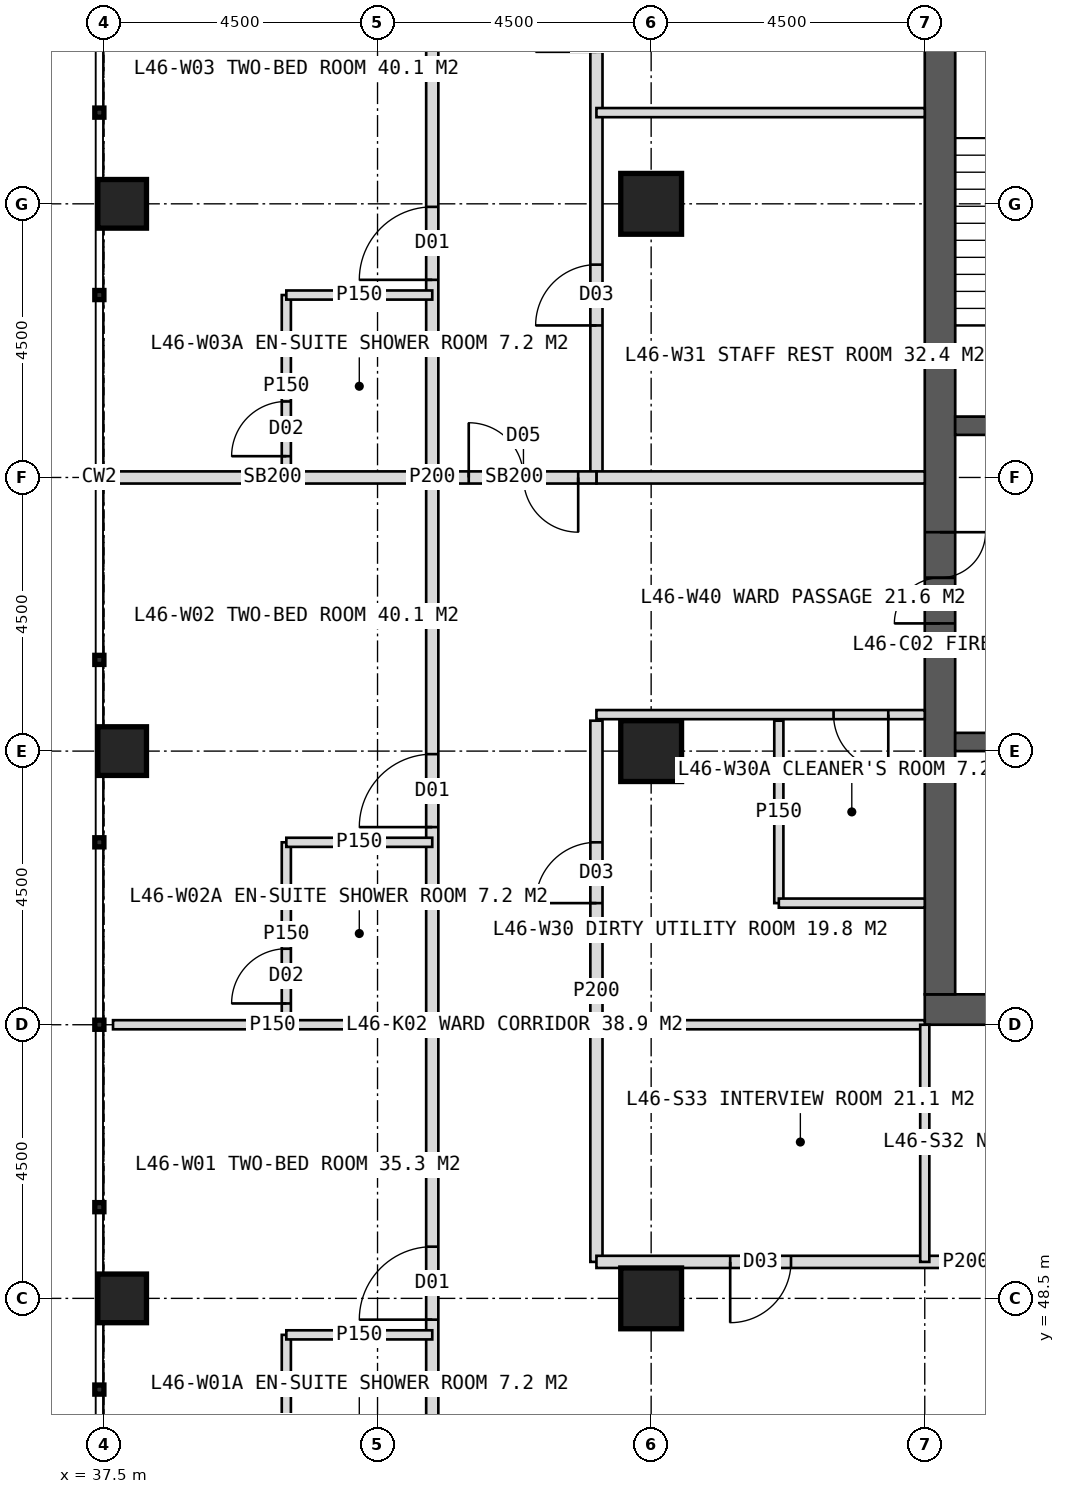
"""IFC4 building model, lengths in metres.
Left out: names, types, materials, properties, quantities, classifications, styles, units other than length and angle.
Written with IfcOpenShell. Run it as: python <this file> out.ifc"""

import sys

from ifc_helpers import new_model, si_unit, direction, frame, frame_2d, origin, origin_2d, place, context, subcontext, project, spatial, rectangle, hollow_rectangle, extrude, element, fill, save


model = new_model("IFC4")
c1 = context("Model", 3, precision=1e-05, world=origin(), true_north=direction((0.0, 1.0)))
c2 = subcontext(c1, "Body", "Model", "MODEL_VIEW")
j1 = project(units=[si_unit("LENGTHUNIT", "METRE"), si_unit("PLANEANGLEUNIT", "RADIAN")], contexts=[c1])
p1 = place(None, origin())
s1 = spatial("IfcSite", under=j1, at=p1, CompositionType="ELEMENT")
p2 = place(p1, origin())
s2 = spatial("IfcBuilding", under=s1, at=p2, CompositionType="ELEMENT")
p3 = place(p2, frame((0.0, 0.0, 193.0)))
s3 = spatial("IfcBuildingStorey", under=s2, at=p3, CompositionType="ELEMENT", Elevation=193.0)
p4 = place(p3, frame((51.0, 53.25, 0.0), z_axis=(0.0, 0.0, 1.0), x_axis=(1.0, 0.0, 0.0)))
e1 = element("IfcWall", 1, at=p4, inside=s3, PredefinedType="SHEAR", context=c2, shape_type="SweptSolid", body=[
    extrude(rectangle(XDim=18.0, YDim=0.5, at=frame_2d((9.0, 0.0))), origin(), (0.0, 0.0, 1.0), 4.0),
])
p5 = place(p4, frame((8.1, 0.0, 0.0)))
e2 = element("IfcOpeningElement", 2, at=p5, cuts=e1, PredefinedType="OPENING", context=c2, shape_type="SweptSolid", body=[
    extrude(rectangle(XDim=1.8, YDim=2.2, at=frame_2d((0.9, 1.1))), frame((0.0, 0.26, 0.0), z_axis=(0.0, -1.0, 0.0), x_axis=(1.0, 0.0, 0.0)), (0.0, 0.0, 1.0), 0.52),
])
p6 = place(p3, frame((51.25, 53.5, 0.0), z_axis=(0.0, 0.0, 1.0), x_axis=(0.0, 1.0, 0.0)))
e3 = element("IfcWall", 3, at=p6, inside=s3, PredefinedType="SHEAR", context=c2, shape_type="SweptSolid", body=[
    extrude(rectangle(XDim=17.0, YDim=0.5, at=frame_2d((8.5, 0.0))), origin(), (0.0, 0.0, 1.0), 4.0),
])
p7 = place(p6, frame((6.1, 0.0, 0.0)))
e4 = element("IfcOpeningElement", 4, at=p7, cuts=e3, PredefinedType="OPENING", context=c2, shape_type="SweptSolid", body=[
    extrude(rectangle(XDim=1.5, YDim=2.2, at=frame_2d((0.75, 1.1))), frame((0.0, 0.26, 0.0), z_axis=(0.0, -1.0, 0.0), x_axis=(1.0, 0.0, 0.0)), (0.0, 0.0, 1.0), 0.52),
])
p8 = place(p3, frame((51.5, 62.85, 0.0), z_axis=(0.0, 0.0, 1.0), x_axis=(1.0, 0.0, 0.0)))
e5 = element("IfcWall", 5, at=p8, inside=s3, PredefinedType="SHEAR", context=c2, shape_type="SweptSolid", body=[
    extrude(rectangle(XDim=3.3, YDim=0.3, at=frame_2d((1.65, 0.0))), origin(), (0.0, 0.0, 1.0), 4.0),
])
p9 = place(p8, frame((1.15, 0.0, 0.0)))
e6 = element("IfcOpeningElement", 6, at=p9, cuts=e5, PredefinedType="OPENING", context=c2, shape_type="SweptSolid", body=[
    extrude(rectangle(XDim=1.2, YDim=2.1, at=frame_2d((0.6, 1.05))), frame((0.0, 0.16, 0.0), z_axis=(0.0, -1.0, 0.0), x_axis=(1.0, 0.0, 0.0)), (0.0, 0.0, 1.0), 0.32),
])
p10 = place(p3, frame((51.5, 57.65, 0.0), z_axis=(0.0, 0.0, 1.0), x_axis=(1.0, 0.0, 0.0)))
e7 = element("IfcWall", 7, at=p10, inside=s3, PredefinedType="SHEAR", context=c2, shape_type="SweptSolid", body=[
    extrude(rectangle(XDim=3.3, YDim=0.3, at=frame_2d((1.65, 0.0))), origin(), (0.0, 0.0, 1.0), 4.0),
])
p11 = place(p10, frame((1.15, 0.0, 0.0)))
e8 = element("IfcOpeningElement", 8, at=p11, cuts=e7, PredefinedType="OPENING", context=c2, shape_type="SweptSolid", body=[
    extrude(rectangle(XDim=1.2, YDim=2.2, at=frame_2d((0.6, 1.1))), frame((0.0, 0.16, 0.0), z_axis=(0.0, -1.0, 0.0), x_axis=(1.0, 0.0, 0.0)), (0.0, 0.0, 1.0), 0.32),
])
for number, where, z_axis, x_axis in (
    (9, (46.5, 48.5, 0.0), (0.0, 0.0, 1.0), (1.0, 0.0, 0.0)),
    (10, (46.5, 57.5, 0.0), (0.0, 0.0, 1.0), (1.0, 0.0, 0.0)),
    (11, (46.5, 66.5, 0.0), (0.0, 0.0, 1.0), (1.0, 0.0, 0.0)),
):
    element("IfcColumn", number, at=place(p3, frame(where, z_axis=z_axis, x_axis=x_axis)), inside=s3, PredefinedType="COLUMN", context=c2, shape_type="SweptSolid", body=[
        extrude(hollow_rectangle(XDim=1.0, YDim=1.0, WallThickness=0.1, at=origin_2d()), origin(), (0.0, 0.0, 1.0), 4.0),
    ])
for number, where, z_axis, x_axis in (
    (12, (37.8, 48.5, 0.0), (0.0, 0.0, 1.0), (1.0, 0.0, 0.0)),
    (13, (37.8, 57.5, 0.0), (0.0, 0.0, 1.0), (1.0, 0.0, 0.0)),
    (14, (37.8, 66.5, 0.0), (0.0, 0.0, 1.0), (1.0, 0.0, 0.0)),
):
    element("IfcColumn", number, at=place(p3, frame(where, z_axis=z_axis, x_axis=x_axis)), inside=s3, PredefinedType="COLUMN", context=c2, shape_type="SweptSolid", body=[
        extrude(hollow_rectangle(XDim=0.8, YDim=0.8, WallThickness=0.08, at=origin_2d()), origin(), (0.0, 0.0, 1.0), 4.0),
    ])
p12 = place(p3, frame((42.9, 53.0, 0.0), z_axis=(0.0, 0.0, 1.0), x_axis=(-1.0, 0.0, 0.0)))
e15 = element("IfcWall", 15, at=p12, inside=s3, PredefinedType="PARTITIONING", context=c2, shape_type="SweptSolid", body=[
    extrude(rectangle(XDim=5.25, YDim=0.15, at=frame_2d((2.625, 0.0))), origin(), (0.0, 0.0, 1.0), 3.75),
])
p13 = place(p3, frame((42.9, 62.0, 0.0), z_axis=(0.0, 0.0, 1.0), x_axis=(-1.0, 0.0, 0.0)))
e16 = element("IfcWall", 16, at=p13, inside=s3, PredefinedType="SOLIDWALL", context=c2, shape_type="SweptSolid", body=[
    extrude(rectangle(XDim=5.25, YDim=0.2, at=frame_2d((2.625, 0.0))), origin(), (0.0, 0.0, 1.0), 2.95),
])
p14 = place(p3, frame((42.9, 44.9, 0.0), z_axis=(0.0, 0.0, 1.0), x_axis=(0.0, 1.0, 0.0)))
e17 = element("IfcWall", 17, at=p14, inside=s3, PredefinedType="PARTITIONING", context=c2, shape_type="SweptSolid", body=[
    extrude(rectangle(XDim=34.2, YDim=0.2, at=frame_2d((17.1, 0.0))), origin(), (0.0, 0.0, 1.0), 3.75),
])
p15 = place(p14, frame((3.25, 0.0, 0.0)))
e18 = element("IfcOpeningElement", 18, at=p15, cuts=e17, PredefinedType="OPENING", context=c2, shape_type="SweptSolid", body=[
    extrude(rectangle(XDim=1.2, YDim=2.2, at=frame_2d((0.6, 1.1))), frame((0.0, 0.11, 0.0), z_axis=(0.0, -1.0, 0.0), x_axis=(1.0, 0.0, 0.0)), (0.0, 0.0, 1.0), 0.22),
])
p16 = place(p14, frame((11.35, 0.0, 0.0)))
e19 = element("IfcOpeningElement", 19, at=p16, cuts=e17, PredefinedType="OPENING", context=c2, shape_type="SweptSolid", body=[
    extrude(rectangle(XDim=1.2, YDim=2.2, at=frame_2d((0.6, 1.1))), frame((0.0, 0.11, 0.0), z_axis=(0.0, -1.0, 0.0), x_axis=(1.0, 0.0, 0.0)), (0.0, 0.0, 1.0), 0.22),
])
p17 = place(p14, frame((20.35, 0.0, 0.0)))
e20 = element("IfcOpeningElement", 20, at=p17, cuts=e17, PredefinedType="OPENING", context=c2, shape_type="SweptSolid", body=[
    extrude(rectangle(XDim=1.2, YDim=2.2, at=frame_2d((0.6, 1.1))), frame((0.0, 0.11, 0.0), z_axis=(0.0, -1.0, 0.0), x_axis=(1.0, 0.0, 0.0)), (0.0, 0.0, 1.0), 0.22),
])
p18 = place(p14, frame((29.35, 0.0, 0.0)))
e21 = element("IfcOpeningElement", 21, at=p18, cuts=e17, PredefinedType="OPENING", context=c2, shape_type="SweptSolid", body=[
    extrude(rectangle(XDim=1.2, YDim=2.2, at=frame_2d((0.6, 1.1))), frame((0.0, 0.11, 0.0), z_axis=(0.0, -1.0, 0.0), x_axis=(1.0, 0.0, 0.0)), (0.0, 0.0, 1.0), 0.22),
])
p19 = place(p3, frame((40.5, 44.9, 0.0), z_axis=(0.0, 0.0, 1.0), x_axis=(0.0, 1.0, 0.0)))
e22 = element("IfcWall", 22, at=p19, inside=s3, PredefinedType="PARTITIONING", context=c2, shape_type="SweptSolid", body=[
    extrude(rectangle(XDim=3.0, YDim=0.15, at=frame_2d((1.5, 0.0))), origin(), (0.0, 0.0, 1.0), 3.75),
])
p20 = place(p19, frame((0.35, 0.0, 0.0)))
e23 = element("IfcOpeningElement", 23, at=p20, cuts=e22, PredefinedType="OPENING", context=c2, shape_type="SweptSolid", body=[
    extrude(rectangle(XDim=0.9, YDim=2.1, at=frame_2d((0.45, 1.05))), frame((0.0, 0.085, 0.0), z_axis=(0.0, -1.0, 0.0), x_axis=(1.0, 0.0, 0.0)), (0.0, 0.0, 1.0), 0.17),
])
p21 = place(p3, frame((42.9, 47.9, 0.0), z_axis=(0.0, 0.0, 1.0), x_axis=(-1.0, 0.0, 0.0)))
e24 = element("IfcWall", 24, at=p21, inside=s3, PredefinedType="PARTITIONING", context=c2, shape_type="SweptSolid", body=[
    extrude(rectangle(XDim=2.4, YDim=0.15, at=frame_2d((1.2, 0.0))), origin(), (0.0, 0.0, 1.0), 3.75),
])
p22 = place(p3, frame((40.5, 53.0, 0.0), z_axis=(0.0, 0.0, 1.0), x_axis=(0.0, 1.0, 0.0)))
e25 = element("IfcWall", 25, at=p22, inside=s3, PredefinedType="PARTITIONING", context=c2, shape_type="SweptSolid", body=[
    extrude(rectangle(XDim=3.0, YDim=0.15, at=frame_2d((1.5, 0.0))), origin(), (0.0, 0.0, 1.0), 3.75),
])
p23 = place(p22, frame((0.35, 0.0, 0.0)))
e26 = element("IfcOpeningElement", 26, at=p23, cuts=e25, PredefinedType="OPENING", context=c2, shape_type="SweptSolid", body=[
    extrude(rectangle(XDim=0.9, YDim=2.1, at=frame_2d((0.45, 1.05))), frame((0.0, 0.085, 0.0), z_axis=(0.0, -1.0, 0.0), x_axis=(1.0, 0.0, 0.0)), (0.0, 0.0, 1.0), 0.17),
])
p24 = place(p3, frame((42.9, 56.0, 0.0), z_axis=(0.0, 0.0, 1.0), x_axis=(-1.0, 0.0, 0.0)))
e27 = element("IfcWall", 27, at=p24, inside=s3, PredefinedType="PARTITIONING", context=c2, shape_type="SweptSolid", body=[
    extrude(rectangle(XDim=2.4, YDim=0.15, at=frame_2d((1.2, 0.0))), origin(), (0.0, 0.0, 1.0), 3.75),
])
p25 = place(p3, frame((40.5, 62.0, 0.0), z_axis=(0.0, 0.0, 1.0), x_axis=(0.0, 1.0, 0.0)))
e28 = element("IfcWall", 28, at=p25, inside=s3, PredefinedType="PARTITIONING", context=c2, shape_type="SweptSolid", body=[
    extrude(rectangle(XDim=3.0, YDim=0.15, at=frame_2d((1.5, 0.0))), origin(), (0.0, 0.0, 1.0), 3.75),
])
p26 = place(p25, frame((0.35, 0.0, 0.0)))
e29 = element("IfcOpeningElement", 29, at=p26, cuts=e28, PredefinedType="OPENING", context=c2, shape_type="SweptSolid", body=[
    extrude(rectangle(XDim=0.9, YDim=2.1, at=frame_2d((0.45, 1.05))), frame((0.0, 0.085, 0.0), z_axis=(0.0, -1.0, 0.0), x_axis=(1.0, 0.0, 0.0)), (0.0, 0.0, 1.0), 0.17),
])
p27 = place(p3, frame((42.9, 65.0, 0.0), z_axis=(0.0, 0.0, 1.0), x_axis=(-1.0, 0.0, 0.0)))
e30 = element("IfcWall", 30, at=p27, inside=s3, PredefinedType="PARTITIONING", context=c2, shape_type="SweptSolid", body=[
    extrude(rectangle(XDim=2.4, YDim=0.15, at=frame_2d((1.2, 0.0))), origin(), (0.0, 0.0, 1.0), 3.75),
])
p28 = place(p3, frame((51.0, 53.0, 0.0), z_axis=(0.0, 0.0, 1.0), x_axis=(-1.0, 0.0, 0.0)))
e31 = element("IfcWall", 31, at=p28, inside=s3, PredefinedType="PARTITIONING", context=c2, shape_type="SweptSolid", body=[
    extrude(rectangle(XDim=5.4, YDim=0.15, at=frame_2d((2.7, 0.0))), origin(), (0.0, 0.0, 1.0), 3.75),
])
p29 = place(p3, frame((45.6, 49.1, 0.0), z_axis=(0.0, 0.0, 1.0), x_axis=(0.0, 1.0, 0.0)))
e32 = element("IfcWall", 32, at=p29, inside=s3, PredefinedType="PARTITIONING", context=c2, shape_type="SweptSolid", body=[
    extrude(rectangle(XDim=8.9, YDim=0.2, at=frame_2d((4.45, 0.0))), origin(), (0.0, 0.0, 1.0), 3.75),
])
p30 = place(p29, frame((5.9, 0.0, 0.0)))
e33 = element("IfcOpeningElement", 33, at=p30, cuts=e32, PredefinedType="OPENING", context=c2, shape_type="SweptSolid", body=[
    extrude(rectangle(XDim=1.0, YDim=2.1, at=frame_2d((0.5, 1.05))), frame((0.0, 0.11, 0.0), z_axis=(0.0, -1.0, 0.0), x_axis=(1.0, 0.0, 0.0)), (0.0, 0.0, 1.0), 0.22),
])
p31 = place(p3, frame((45.6, 62.0, 0.0), z_axis=(0.0, 0.0, 1.0), x_axis=(0.0, 1.0, 0.0)))
e34 = element("IfcWall", 34, at=p31, inside=s3, PredefinedType="PARTITIONING", context=c2, shape_type="SweptSolid", body=[
    extrude(rectangle(XDim=14.4, YDim=0.2, at=frame_2d((7.2, 0.0))), origin(), (0.0, 0.0, 1.0), 3.75),
])
p32 = place(p31, frame((2.5, 0.0, 0.0)))
e35 = element("IfcOpeningElement", 35, at=p32, cuts=e34, PredefinedType="OPENING", context=c2, shape_type="SweptSolid", body=[
    extrude(rectangle(XDim=1.0, YDim=2.1, at=frame_2d((0.5, 1.05))), frame((0.0, 0.11, 0.0), z_axis=(0.0, -1.0, 0.0), x_axis=(1.0, 0.0, 0.0)), (0.0, 0.0, 1.0), 0.22),
])
p33 = place(p31, frame((7.0, 0.0, 0.0)))
e36 = element("IfcOpeningElement", 36, at=p33, cuts=e34, PredefinedType="OPENING", context=c2, shape_type="SweptSolid", body=[
    extrude(rectangle(XDim=1.0, YDim=2.1, at=frame_2d((0.5, 1.05))), frame((0.0, 0.11, 0.0), z_axis=(0.0, -1.0, 0.0), x_axis=(1.0, 0.0, 0.0)), (0.0, 0.0, 1.0), 0.22),
])
p34 = place(p31, frame((11.2, 0.0, 0.0)))
e37 = element("IfcOpeningElement", 37, at=p34, cuts=e34, PredefinedType="OPENING", context=c2, shape_type="SweptSolid", body=[
    extrude(rectangle(XDim=1.0, YDim=2.1, at=frame_2d((0.5, 1.05))), frame((0.0, 0.11, 0.0), z_axis=(0.0, -1.0, 0.0), x_axis=(1.0, 0.0, 0.0)), (0.0, 0.0, 1.0), 0.22),
])
p35 = place(p3, frame((51.0, 58.1, 0.0), z_axis=(0.0, 0.0, 1.0), x_axis=(-1.0, 0.0, 0.0)))
e38 = element("IfcWall", 38, at=p35, inside=s3, PredefinedType="PARTITIONING", context=c2, shape_type="SweptSolid", body=[
    extrude(rectangle(XDim=5.4, YDim=0.15, at=frame_2d((2.7, 0.0))), origin(), (0.0, 0.0, 1.0), 3.75),
])
p36 = place(p35, frame((0.6, 0.0, 0.0)))
e39 = element("IfcOpeningElement", 39, at=p36, cuts=e38, PredefinedType="OPENING", context=c2, shape_type="SweptSolid", body=[
    extrude(rectangle(XDim=0.9, YDim=2.1, at=frame_2d((0.45, 1.05))), frame((0.0, 0.085, 0.0), z_axis=(0.0, -1.0, 0.0), x_axis=(1.0, 0.0, 0.0)), (0.0, 0.0, 1.0), 0.17),
])
p37 = place(p3, frame((51.0, 62.0, 0.0), z_axis=(0.0, 0.0, 1.0), x_axis=(-1.0, 0.0, 0.0)))
e40 = element("IfcWall", 40, at=p37, inside=s3, PredefinedType="SOLIDWALL", context=c2, shape_type="SweptSolid", body=[
    extrude(rectangle(XDim=5.4, YDim=0.2, at=frame_2d((2.7, 0.0))), origin(), (0.0, 0.0, 1.0), 2.95),
])
p38 = place(p3, frame((51.0, 68.0, 0.0), z_axis=(0.0, 0.0, 1.0), x_axis=(-1.0, 0.0, 0.0)))
e41 = element("IfcWall", 41, at=p38, inside=s3, PredefinedType="PARTITIONING", context=c2, shape_type="SweptSolid", body=[
    extrude(rectangle(XDim=5.4, YDim=0.15, at=frame_2d((2.7, 0.0))), origin(), (0.0, 0.0, 1.0), 3.75),
])
p39 = place(p3, frame((48.6, 55.0, 0.0), z_axis=(0.0, 0.0, 1.0), x_axis=(0.0, 1.0, 0.0)))
e42 = element("IfcWall", 42, at=p39, inside=s3, PredefinedType="PARTITIONING", context=c2, shape_type="SweptSolid", body=[
    extrude(rectangle(XDim=3.0, YDim=0.15, at=frame_2d((1.5, 0.0))), origin(), (0.0, 0.0, 1.0), 3.75),
])
p40 = place(p3, frame((51.0, 55.0, 0.0), z_axis=(0.0, 0.0, 1.0), x_axis=(-1.0, 0.0, 0.0)))
e43 = element("IfcWall", 43, at=p40, inside=s3, PredefinedType="PARTITIONING", context=c2, shape_type="SweptSolid", body=[
    extrude(rectangle(XDim=2.4, YDim=0.15, at=frame_2d((1.2, 0.0))), origin(), (0.0, 0.0, 1.0), 3.75),
])
p41 = place(p3, frame((57.75, 49.1, 0.0), z_axis=(0.0, 0.0, 1.0), x_axis=(-1.0, 0.0, 0.0)))
e44 = element("IfcWall", 44, at=p41, inside=s3, PredefinedType="PARTITIONING", context=c2, shape_type="SweptSolid", body=[
    extrude(rectangle(XDim=12.15, YDim=0.2, at=frame_2d((6.075, 0.0))), origin(), (0.0, 0.0, 1.0), 3.75),
])
p42 = place(p41, frame((4.3, 0.0, 0.0)))
e45 = element("IfcOpeningElement", 45, at=p42, cuts=e44, PredefinedType="OPENING", context=c2, shape_type="SweptSolid", body=[
    extrude(rectangle(XDim=1.0, YDim=2.1, at=frame_2d((0.5, 1.05))), frame((0.0, 0.11, 0.0), z_axis=(0.0, -1.0, 0.0), x_axis=(1.0, 0.0, 0.0)), (0.0, 0.0, 1.0), 0.22),
])
p43 = place(p41, frame((8.95, 0.0, 0.0)))
e46 = element("IfcOpeningElement", 46, at=p43, cuts=e44, PredefinedType="OPENING", context=c2, shape_type="SweptSolid", body=[
    extrude(rectangle(XDim=1.0, YDim=2.1, at=frame_2d((0.5, 1.05))), frame((0.0, 0.11, 0.0), z_axis=(0.0, -1.0, 0.0), x_axis=(1.0, 0.0, 0.0)), (0.0, 0.0, 1.0), 0.22),
])
p44 = place(p3, frame((51.0, 53.0, 0.0), z_axis=(0.0, 0.0, 1.0), x_axis=(0.0, -1.0, 0.0)))
e47 = element("IfcWall", 47, at=p44, inside=s3, PredefinedType="PARTITIONING", context=c2, shape_type="SweptSolid", body=[
    extrude(rectangle(XDim=3.9, YDim=0.15, at=frame_2d((1.95, 0.0))), origin(), (0.0, 0.0, 1.0), 3.75),
])
p45 = place(p3, frame((45.6, 62.0, 0.0), z_axis=(0.0, 0.0, 1.0), x_axis=(-1.0, 0.0, 0.0)))
e48 = element("IfcWall", 48, at=p45, inside=s3, PredefinedType="SOLIDWALL", context=c2, shape_type="SweptSolid", body=[
    extrude(rectangle(XDim=2.7, YDim=0.2, at=frame_2d((1.35, 0.0))), origin(), (0.0, 0.0, 1.0), 2.95),
])
p46 = place(p45, frame((0.3, 0.0, 0.0)))
e49 = element("IfcOpeningElement", 49, at=p46, cuts=e48, PredefinedType="OPENING", context=c2, shape_type="SweptSolid", body=[
    extrude(rectangle(XDim=1.8, YDim=2.2, at=frame_2d((0.9, 1.1))), frame((0.0, 0.11, 0.0), z_axis=(0.0, -1.0, 0.0), x_axis=(1.0, 0.0, 0.0)), (0.0, 0.0, 1.0), 0.22),
])
p47 = place(p15, origin())
e50 = element("IfcDoor", 50, at=p47, inside=s3, OperationType="SINGLE_SWING_LEFT", PredefinedType="DOOR", context=c2, shape_type="SweptSolid", body=[
    extrude(rectangle(XDim=1.2, YDim=2.2, at=frame_2d((0.6, 1.1))), frame((0.0, 0.025, 0.0), z_axis=(0.0, -1.0, 0.0), x_axis=(1.0, 0.0, 0.0)), (0.0, 0.0, 1.0), 0.05),
])
fill(e18, e50)
p48 = place(p16, origin())
e51 = element("IfcDoor", 51, at=p48, inside=s3, OperationType="SINGLE_SWING_LEFT", PredefinedType="DOOR", context=c2, shape_type="SweptSolid", body=[
    extrude(rectangle(XDim=1.2, YDim=2.2, at=frame_2d((0.6, 1.1))), frame((0.0, 0.025, 0.0), z_axis=(0.0, -1.0, 0.0), x_axis=(1.0, 0.0, 0.0)), (0.0, 0.0, 1.0), 0.05),
])
fill(e19, e51)
p49 = place(p23, origin())
e52 = element("IfcDoor", 52, at=p49, inside=s3, OperationType="SINGLE_SWING_LEFT", PredefinedType="DOOR", context=c2, shape_type="SweptSolid", body=[
    extrude(rectangle(XDim=0.9, YDim=2.1, at=frame_2d((0.45, 1.05))), frame((0.0, 0.025, 0.0), z_axis=(0.0, -1.0, 0.0), x_axis=(1.0, 0.0, 0.0)), (0.0, 0.0, 1.0), 0.05),
])
fill(e26, e52)
p50 = place(p17, origin())
e53 = element("IfcDoor", 53, at=p50, inside=s3, OperationType="SINGLE_SWING_LEFT", PredefinedType="DOOR", context=c2, shape_type="SweptSolid", body=[
    extrude(rectangle(XDim=1.2, YDim=2.2, at=frame_2d((0.6, 1.1))), frame((0.0, 0.025, 0.0), z_axis=(0.0, -1.0, 0.0), x_axis=(1.0, 0.0, 0.0)), (0.0, 0.0, 1.0), 0.05),
])
fill(e20, e53)
p51 = place(p26, origin())
e54 = element("IfcDoor", 54, at=p51, inside=s3, OperationType="SINGLE_SWING_LEFT", PredefinedType="DOOR", context=c2, shape_type="SweptSolid", body=[
    extrude(rectangle(XDim=0.9, YDim=2.1, at=frame_2d((0.45, 1.05))), frame((0.0, 0.025, 0.0), z_axis=(0.0, -1.0, 0.0), x_axis=(1.0, 0.0, 0.0)), (0.0, 0.0, 1.0), 0.05),
])
fill(e29, e54)
p52 = place(p36, origin())
e55 = element("IfcDoor", 55, at=p52, inside=s3, OperationType="SINGLE_SWING_LEFT", PredefinedType="DOOR", context=c2, shape_type="SweptSolid", body=[
    extrude(rectangle(XDim=0.9, YDim=2.1, at=frame_2d((0.45, 1.05))), frame((0.0, 0.025, 0.0), z_axis=(0.0, -1.0, 0.0), x_axis=(1.0, 0.0, 0.0)), (0.0, 0.0, 1.0), 0.05),
])
fill(e39, e55)
p53 = place(p30, origin())
e56 = element("IfcDoor", 56, at=p53, inside=s3, OperationType="SINGLE_SWING_LEFT", PredefinedType="DOOR", context=c2, shape_type="SweptSolid", body=[
    extrude(rectangle(XDim=1.0, YDim=2.1, at=frame_2d((0.5, 1.05))), frame((0.0, 0.025, 0.0), z_axis=(0.0, -1.0, 0.0), x_axis=(1.0, 0.0, 0.0)), (0.0, 0.0, 1.0), 0.05),
])
fill(e33, e56)
p54 = place(p32, origin())
e57 = element("IfcDoor", 57, at=p54, inside=s3, OperationType="SINGLE_SWING_LEFT", PredefinedType="DOOR", context=c2, shape_type="SweptSolid", body=[
    extrude(rectangle(XDim=1.0, YDim=2.1, at=frame_2d((0.5, 1.05))), frame((0.0, 0.025, 0.0), z_axis=(0.0, -1.0, 0.0), x_axis=(1.0, 0.0, 0.0)), (0.0, 0.0, 1.0), 0.05),
])
fill(e35, e57)
p55 = place(p43, origin())
e58 = element("IfcDoor", 58, at=p55, inside=s3, OperationType="SINGLE_SWING_RIGHT", PredefinedType="DOOR", context=c2, shape_type="SweptSolid", body=[
    extrude(rectangle(XDim=1.0, YDim=2.1, at=frame_2d((0.5, 1.05))), frame((0.0, 0.025, 0.0), z_axis=(0.0, -1.0, 0.0), x_axis=(1.0, 0.0, 0.0)), (0.0, 0.0, 1.0), 0.05),
])
fill(e46, e58)
p56 = place(p46, origin())
e59 = element("IfcDoor", 59, at=p56, inside=s3, OperationType="DOUBLE_DOOR_DOUBLE_SWING", PredefinedType="DOOR", context=c2, shape_type="SweptSolid", body=[
    extrude(rectangle(XDim=1.8, YDim=2.2, at=frame_2d((0.9, 1.1))), frame((0.0, 0.025, 0.0), z_axis=(0.0, -1.0, 0.0), x_axis=(1.0, 0.0, 0.0)), (0.0, 0.0, 1.0), 0.05),
])
fill(e49, e59)
p57 = place(p7, origin())
e60 = element("IfcDoor", 60, at=p57, inside=s3, OperationType="DOUBLE_DOOR_SINGLE_SWING", PredefinedType="DOOR", context=c2, shape_type="SweptSolid", body=[
    extrude(rectangle(XDim=1.5, YDim=2.2, at=frame_2d((0.75, 1.1))), frame((0.0, 0.025, 0.0), z_axis=(0.0, -1.0, 0.0), x_axis=(1.0, 0.0, 0.0)), (0.0, 0.0, 1.0), 0.05),
])
fill(e4, e60)
save(model, sys.argv[1])
